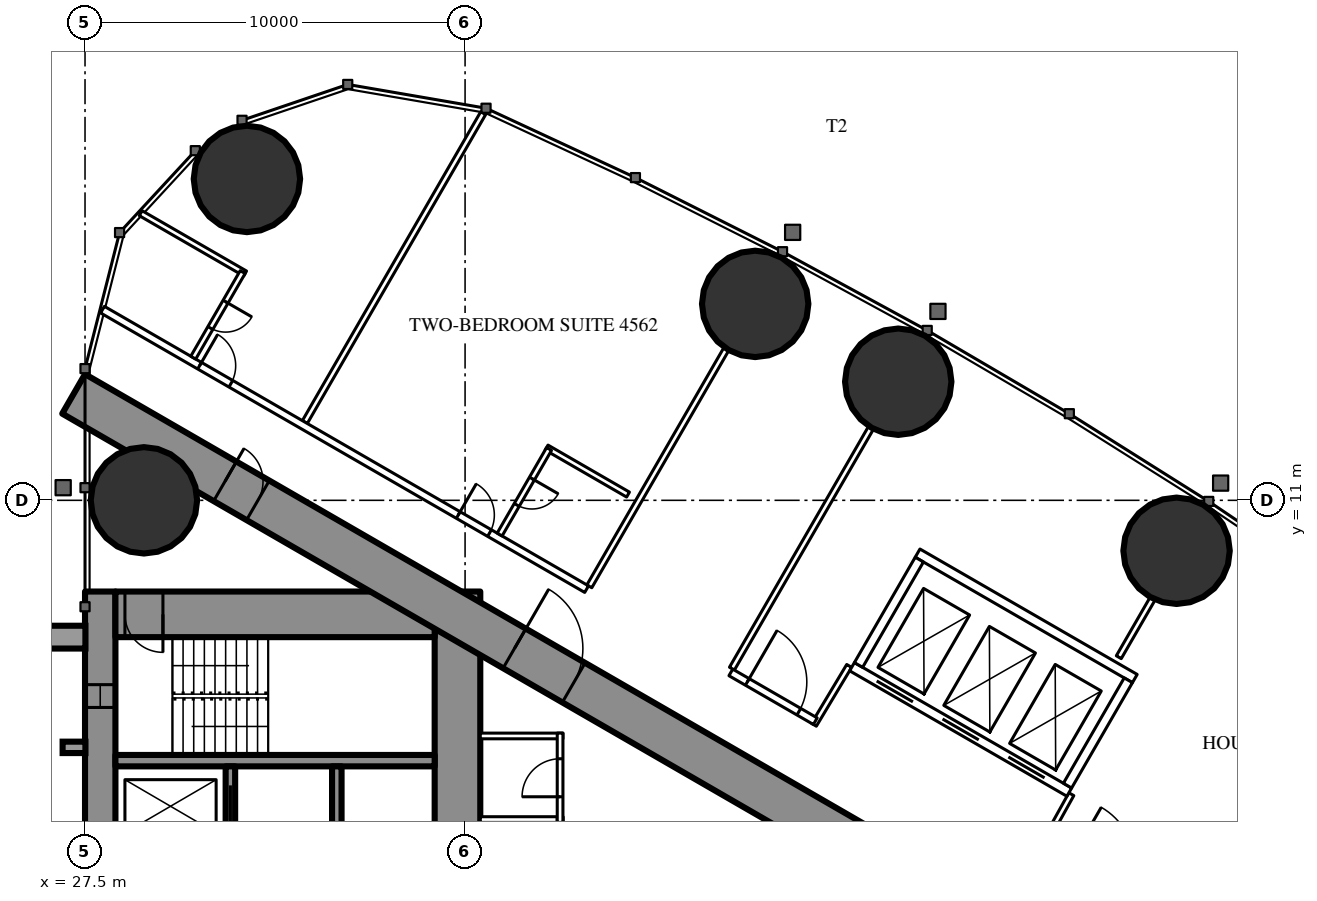
"""IFC4 building model, lengths in metres.
Left out: names, types, materials, properties, quantities, classifications, styles, units other than length and angle.
Written with IfcOpenShell. Run it as: python <this file> out.ifc"""

import sys

from ifc_helpers import new_model, si_unit, direction, frame, frame_2d, origin, origin_2d, place, context, subcontext, project, spatial, rectangle, circle, extrude, element, fill, save


model = new_model("IFC4")
c1 = context("Model", 3, precision=1e-05, world=origin(), true_north=direction((0.0, 1.0)))
c2 = subcontext(c1, "Body", "Model", "MODEL_VIEW")
j1 = project(units=[si_unit("LENGTHUNIT", "METRE"), si_unit("PLANEANGLEUNIT", "RADIAN")], contexts=[c1])
p1 = place(None, origin())
s1 = spatial("IfcSite", under=j1, at=p1, CompositionType="ELEMENT")
p2 = place(p1, origin())
s2 = spatial("IfcBuilding", under=s1, at=p2, CompositionType="ELEMENT")
p3 = place(p2, frame((0.0, 0.0, 170.3)))
s3 = spatial("IfcBuildingStorey", under=s2, at=p3, CompositionType="ELEMENT", Elevation=170.3)
for number, where, z_axis, x_axis in (
    (1, (31.76, 19.456, 0.0), (0.0, 0.0, 1.0), (1.0, 0.0, 0.0)),
    (2, (29.05, 11.0, 0.0), (0.0, 0.0, 1.0), (1.0, 0.0, 0.0)),
    (3, (56.221, 9.672, 0.0), (0.0, 0.0, 1.0), (1.0, 0.0, 0.0)),
    (4, (48.897, 14.121, 0.0), (0.0, 0.0, 1.0), (1.0, 0.0, 0.0)),
    (5, (45.134, 16.168, 0.0), (0.0, 0.0, 1.0), (1.0, 0.0, 0.0)),
):
    element("IfcColumn", number, at=place(p3, frame(where, z_axis=z_axis, x_axis=x_axis)), inside=s3, PredefinedType="COLUMN", context=c2, shape_type="SweptSolid", body=[
        extrude(circle(Radius=1.4, at=origin_2d()), origin(), (0.0, 0.0, 1.0), 3.5),
    ])
p4 = place(p3, frame((27.9, -8.6, 0.0), z_axis=(0.0, 0.0, 1.0), x_axis=(0.0, 1.0, 0.0)))
e6 = element("IfcWall", 6, at=p4, inside=s3, PredefinedType="SHEAR", context=c2, shape_type="SweptSolid", body=[
    extrude(rectangle(XDim=17.2, YDim=0.8, at=frame_2d((8.6, 0.0))), origin(), (0.0, 0.0, 1.0), 3.5),
])
p5 = place(p4, frame((2.45, 0.0, 0.6)))
e7 = element("IfcOpeningElement", 7, at=p5, cuts=e6, PredefinedType="OPENING", context=c2, shape_type="SweptSolid", body=[
    extrude(rectangle(XDim=0.6, YDim=2.1, at=frame_2d((0.3, 1.05))), frame((0.0, 0.41, 0.0), z_axis=(0.0, -1.0, 0.0), x_axis=(1.0, 0.0, 0.0)), (0.0, 0.0, 1.0), 0.82),
])
p6 = place(p4, frame((14.15, 0.0, 0.6)))
e8 = element("IfcOpeningElement", 8, at=p6, cuts=e6, PredefinedType="OPENING", context=c2, shape_type="SweptSolid", body=[
    extrude(rectangle(XDim=0.6, YDim=2.1, at=frame_2d((0.3, 1.05))), frame((0.0, 0.41, 0.0), z_axis=(0.0, -1.0, 0.0), x_axis=(1.0, 0.0, 0.0)), (0.0, 0.0, 1.0), 0.82),
])
p7 = place(p3, frame((37.3, -8.6, 0.0), z_axis=(0.0, 0.0, 1.0), x_axis=(0.0, 1.0, 0.0)))
e9 = element("IfcWall", 9, at=p7, inside=s3, PredefinedType="SHEAR", context=c2, shape_type="SweptSolid", body=[
    extrude(rectangle(XDim=17.2, YDim=1.2, at=frame_2d((8.6, 0.0))), origin(), (0.0, 0.0, 1.0), 3.5),
])
p8 = place(p7, frame((7.7, 0.0, 0.0)))
e10 = element("IfcOpeningElement", 10, at=p8, cuts=e9, PredefinedType="OPENING", context=c2, shape_type="SweptSolid", body=[
    extrude(rectangle(XDim=1.8, YDim=2.2, at=frame_2d((0.9, 1.1))), frame((0.0, 0.61, 0.0), z_axis=(0.0, -1.0, 0.0), x_axis=(1.0, 0.0, 0.0)), (0.0, 0.0, 1.0), 1.22),
])
p9 = place(p3, frame((28.3, 8.0, 0.0), z_axis=(0.0, 0.0, 1.0), x_axis=(1.0, 0.0, 0.0)))
e11 = element("IfcWall", 11, at=p9, inside=s3, PredefinedType="SHEAR", context=c2, shape_type="SweptSolid", body=[
    extrude(rectangle(XDim=8.4, YDim=1.2, at=frame_2d((4.2, 0.0))), origin(), (0.0, 0.0, 1.0), 3.5),
])
p10 = place(p9, frame((0.25, 0.0, 0.0)))
e12 = element("IfcOpeningElement", 12, at=p10, cuts=e11, PredefinedType="OPENING", context=c2, shape_type="SweptSolid", body=[
    extrude(rectangle(XDim=1.0, YDim=2.2, at=frame_2d((0.5, 1.1))), frame((0.0, 0.61, 0.0), z_axis=(0.0, -1.0, 0.0), x_axis=(1.0, 0.0, 0.0)), (0.0, 0.0, 1.0), 1.22),
])
p11 = place(p3, frame((28.3, 4.15, 0.0), z_axis=(0.0, 0.0, 1.0), x_axis=(1.0, 0.0, 0.0)))
e13 = element("IfcWall", 13, at=p11, inside=s3, PredefinedType="SHEAR", context=c2, shape_type="SweptSolid", body=[
    extrude(rectangle(XDim=8.4, YDim=0.3, at=frame_2d((4.2, 0.0))), origin(), (0.0, 0.0, 1.0), 3.5),
])
p12 = place(p3, frame((31.325, 1.9, 0.0), z_axis=(0.0, 0.0, 1.0), x_axis=(0.0, 1.0, 0.0)))
e14 = element("IfcWall", 14, at=p12, inside=s3, PredefinedType="SHEAR", context=c2, shape_type="SweptSolid", body=[
    extrude(rectangle(XDim=2.1, YDim=0.25, at=frame_2d((1.05, 0.0))), origin(), (0.0, 0.0, 1.0), 3.5),
])
p13 = place(p12, frame((0.5, 0.0, 0.0)))
e15 = element("IfcOpeningElement", 15, at=p13, cuts=e14, PredefinedType="OPENING", context=c2, shape_type="SweptSolid", body=[
    extrude(rectangle(XDim=1.1, YDim=2.2, at=frame_2d((0.55, 1.1))), frame((0.0, 0.135, 0.0), z_axis=(0.0, -1.0, 0.0), x_axis=(1.0, 0.0, 0.0)), (0.0, 0.0, 1.0), 0.27),
])
p14 = place(p3, frame((34.125, 1.65, 0.0), z_axis=(0.0, 0.0, 1.0), x_axis=(0.0, 1.0, 0.0)))
e16 = element("IfcWall", 16, at=p14, inside=s3, PredefinedType="SHEAR", context=c2, shape_type="SweptSolid", body=[
    extrude(rectangle(XDim=2.35, YDim=0.25, at=frame_2d((1.175, 0.0))), origin(), (0.0, 0.0, 1.0), 3.5),
])
p15 = place(p3, frame((27.2, 13.8, 0.0), z_axis=(0.0, 0.0, 1.0), x_axis=(0.866024515034, -0.500001539357, 0.0)))
e17 = element("IfcWall", 17, at=p15, inside=s3, PredefinedType="SHEAR", context=c2, shape_type="SweptSolid", body=[
    extrude(rectangle(XDim=26.907, YDim=1.2, at=frame_2d((13.454, 0.0))), origin(), (0.0, 0.0, 1.0), 3.5),
])
p16 = place(p15, frame((4.6, 0.0, 0.0)))
e18 = element("IfcOpeningElement", 18, at=p16, cuts=e17, PredefinedType="OPENING", context=c2, shape_type="SweptSolid", body=[
    extrude(rectangle(XDim=1.0, YDim=2.2, at=frame_2d((0.5, 1.1))), frame((0.0, 0.61, 0.0), z_axis=(0.0, -1.0, 0.0), x_axis=(1.0, 0.0, 0.0)), (0.0, 0.0, 1.0), 1.22),
])
p17 = place(p15, frame((13.395, 0.0, 0.0)))
e19 = element("IfcOpeningElement", 19, at=p17, cuts=e17, PredefinedType="OPENING", context=c2, shape_type="SweptSolid", body=[
    extrude(rectangle(XDim=1.8, YDim=2.2, at=frame_2d((0.9, 1.1))), frame((0.0, 0.61, 0.0), z_axis=(0.0, -1.0, 0.0), x_axis=(1.0, 0.0, 0.0)), (0.0, 0.0, 1.0), 1.22),
])
p18 = place(p3, frame((33.284, 13.059, 0.0), z_axis=(0.0, 0.0, 1.0), x_axis=(0.499985904184, 0.866033541855, 0.0)))
e20 = element("IfcWall", 20, at=p18, inside=s3, PredefinedType="PARTITIONING", context=c2, shape_type="SweptSolid", body=[
    extrude(rectangle(XDim=9.385, YDim=0.15, at=frame_2d((4.693, 0.0))), origin(), (0.0, 0.0, 1.0), 3.25),
])
p19 = place(p3, frame((40.769, 8.737, 0.0), z_axis=(0.0, 0.0, 1.0), x_axis=(0.500013115284, 0.866017831539, 0.0)))
e21 = element("IfcWall", 21, at=p19, inside=s3, PredefinedType="PARTITIONING", context=c2, shape_type="SweptSolid", body=[
    extrude(rectangle(XDim=7.198, YDim=0.15, at=frame_2d((3.599, 0.0))), origin(), (0.0, 0.0, 1.0), 2.3),
])
p20 = place(p3, frame((44.521, 6.571, 0.0), z_axis=(0.0, 0.0, 1.0), x_axis=(0.500020376429, 0.866013639128, 0.0)))
e22 = element("IfcWall", 22, at=p20, inside=s3, PredefinedType="PARTITIONING", context=c2, shape_type="SweptSolid", body=[
    extrude(rectangle(XDim=7.306, YDim=0.15, at=frame_2d((3.653, 0.0))), origin(), (0.0, 0.0, 1.0), 2.3),
])
p21 = place(p3, frame((54.7, 6.872, 0.0), z_axis=(0.0, 0.0, 1.0), x_axis=(0.499989690894, 0.866031355668, 0.0)))
e23 = element("IfcWall", 23, at=p21, inside=s3, PredefinedType="PARTITIONING", context=c2, shape_type="SweptSolid", body=[
    extrude(rectangle(XDim=1.766, YDim=0.15, at=frame_2d((0.883, 0.0))), origin(), (0.0, 0.0, 1.0), 3.25),
])
p22 = place(p3, frame((52.576, 1.689, 0.0), z_axis=(0.0, 0.0, 1.0), x_axis=(0.485424724123, 0.874278466629, 0.0)))
e24 = element("IfcWall", 24, at=p22, inside=s3, PredefinedType="PARTITIONING", context=c2, shape_type="SweptSolid", body=[
    extrude(rectangle(XDim=1.805, YDim=0.15, at=frame_2d((0.903, 0.0))), origin(), (0.0, 0.0, 1.0), 3.25),
])
p23 = place(p3, frame((47.606, 6.643, 0.0), z_axis=(0.0, 0.0, 1.0), x_axis=(-0.514237157483, -0.857648031458, 0.0)))
e25 = element("IfcWall", 25, at=p23, inside=s3, PredefinedType="PARTITIONING", context=c2, shape_type="SweptSolid", body=[
    extrude(rectangle(XDim=1.805, YDim=0.15, at=frame_2d((0.902, 0.0))), origin(), (0.0, 0.0, 1.0), 3.25),
])
p24 = place(p3, frame((27.959, 16.017, 0.0), z_axis=(0.0, 0.0, 1.0), x_axis=(0.866024165033, -0.500002145574, 0.0)))
e26 = element("IfcWall", 26, at=p24, inside=s3, PredefinedType="PARTITIONING", context=c2, shape_type="SweptSolid", body=[
    extrude(rectangle(XDim=14.709, YDim=0.2, at=frame_2d((7.354, 0.0))), origin(), (0.0, 0.0, 1.0), 3.25),
])
p25 = place(p24, frame((10.809, 0.0, 0.0)))
e27 = element("IfcOpeningElement", 27, at=p25, cuts=e26, PredefinedType="OPENING", context=c2, shape_type="SweptSolid", body=[
    extrude(rectangle(XDim=0.95, YDim=2.2, at=frame_2d((0.475, 1.1))), frame((0.0, 0.11, 0.0), z_axis=(0.0, -1.0, 0.0), x_axis=(1.0, 0.0, 0.0)), (0.0, 0.0, 1.0), 0.22),
])
p26 = place(p24, frame((2.95, 0.0, 0.0)))
e28 = element("IfcOpeningElement", 28, at=p26, cuts=e26, PredefinedType="OPENING", context=c2, shape_type="SweptSolid", body=[
    extrude(rectangle(XDim=0.95, YDim=2.2, at=frame_2d((0.475, 1.1))), frame((0.0, 0.11, 0.0), z_axis=(0.0, -1.0, 0.0), x_axis=(1.0, 0.0, 0.0)), (0.0, 0.0, 1.0), 0.22),
])
p27 = place(p3, frame((44.493, 6.472, 0.0), z_axis=(0.0, 0.0, 1.0), x_axis=(0.866027140358, -0.499996992154, 0.0)))
e29 = element("IfcWall", 29, at=p27, inside=s3, PredefinedType="PARTITIONING", context=c2, shape_type="SweptSolid", body=[
    extrude(rectangle(XDim=2.566, YDim=0.2, at=frame_2d((1.283, 0.0))), origin(), (0.0, 0.0, 1.0), 3.25),
])
p28 = place(p27, frame((0.5, 0.0, 0.0)))
e30 = element("IfcOpeningElement", 30, at=p28, cuts=e29, PredefinedType="OPENING", context=c2, shape_type="SweptSolid", body=[
    extrude(rectangle(XDim=1.566, YDim=2.2, at=frame_2d((0.783, 1.1))), frame((0.0, 0.11, 0.0), z_axis=(0.0, -1.0, 0.0), x_axis=(1.0, 0.0, 0.0)), (0.0, 0.0, 1.0), 0.22),
])
p29 = place(p3, frame((39.645, 12.389, 0.0), z_axis=(0.0, 0.0, 1.0), x_axis=(0.866006523861, -0.500032699561, 0.0)))
e31 = element("IfcWall", 31, at=p29, inside=s3, PredefinedType="PARTITIONING", context=c2, shape_type="SweptSolid", body=[
    extrude(rectangle(XDim=2.475, YDim=0.15, at=frame_2d((1.237, 0.0))), origin(), (0.0, 0.0, 1.0), 3.25),
])
p30 = place(p3, frame((38.409, 10.099, 0.0), z_axis=(0.0, 0.0, 1.0), x_axis=(0.500006934395, 0.866021400173, 0.0)))
e32 = element("IfcWall", 32, at=p30, inside=s3, PredefinedType="PARTITIONING", context=c2, shape_type="SweptSolid", body=[
    extrude(rectangle(XDim=2.6, YDim=0.15, at=frame_2d((1.3, 0.0))), origin(), (0.0, 0.0, 1.0), 3.25),
])
p31 = place(p30, frame((0.9, 0.0, 0.0)))
e33 = element("IfcOpeningElement", 33, at=p31, cuts=e32, PredefinedType="OPENING", context=c2, shape_type="SweptSolid", body=[
    extrude(rectangle(XDim=0.8, YDim=2.2, at=frame_2d((0.4, 1.1))), frame((0.0, 0.085, 0.0), z_axis=(0.0, -1.0, 0.0), x_axis=(1.0, 0.0, 0.0)), (0.0, 0.0, 1.0), 0.17),
])
p32 = place(p3, frame((28.965, 18.554, 0.0), z_axis=(0.0, 0.0, 1.0), x_axis=(0.866008740531, -0.500028860491, 0.0)))
e34 = element("IfcWall", 34, at=p32, inside=s3, PredefinedType="PARTITIONING", context=c2, shape_type="SweptSolid", body=[
    extrude(rectangle(XDim=3.173, YDim=0.15, at=frame_2d((1.586, 0.0))), origin(), (0.0, 0.0, 1.0), 3.25),
])
p33 = place(p3, frame((30.348, 14.754, 0.0), z_axis=(0.0, 0.0, 1.0), x_axis=(0.500006934395, 0.866021400173, 0.0)))
e35 = element("IfcWall", 35, at=p33, inside=s3, PredefinedType="PARTITIONING", context=c2, shape_type="SweptSolid", body=[
    extrude(rectangle(XDim=2.6, YDim=0.15, at=frame_2d((1.3, 0.0))), origin(), (0.0, 0.0, 1.0), 2.3),
])
p34 = place(p33, frame((0.9, 0.0, 0.0)))
e36 = element("IfcOpeningElement", 36, at=p34, cuts=e35, PredefinedType="OPENING", context=c2, shape_type="SweptSolid", body=[
    extrude(rectangle(XDim=0.8, YDim=2.2, at=frame_2d((0.4, 1.1))), frame((0.0, 0.085, 0.0), z_axis=(0.0, -1.0, 0.0), x_axis=(1.0, 0.0, 0.0)), (0.0, 0.0, 1.0), 0.17),
])
for number, where, z_axis, x_axis in (
    (37, (37.9, 2.6, 0.0), (0.0, 0.0, 1.0), (1.0, 0.0, 0.0)),
    (38, (37.9, 4.8, 0.0), (0.0, 0.0, 1.0), (1.0, 0.0, 0.0)),
):
    element("IfcWall", number, at=place(p3, frame(where, z_axis=z_axis, x_axis=x_axis)), inside=s3, PredefinedType="PARTITIONING", context=c2, shape_type="SweptSolid", body=[
        extrude(rectangle(XDim=2.175, YDim=0.15, at=frame_2d((1.087, 0.0))), origin(), (0.0, 0.0, 1.0), 3.25),
    ])
p35 = place(p3, frame((40.0, 1.125, 0.0), z_axis=(0.0, 0.0, 1.0), x_axis=(0.0, 1.0, 0.0)))
e39 = element("IfcWall", 39, at=p35, inside=s3, PredefinedType="PARTITIONING", context=c2, shape_type="SweptSolid", body=[
    extrude(rectangle(XDim=1.55, YDim=0.15, at=frame_2d((0.775, 0.0))), origin(), (0.0, 0.0, 1.0), 3.25),
])
p36 = place(p35, frame((0.275, 0.0, 0.0)))
e40 = element("IfcOpeningElement", 40, at=p36, cuts=e39, PredefinedType="OPENING", context=c2, shape_type="SweptSolid", body=[
    extrude(rectangle(XDim=1.0, YDim=2.2, at=frame_2d((0.5, 1.1))), frame((0.0, 0.085, 0.0), z_axis=(0.0, -1.0, 0.0), x_axis=(1.0, 0.0, 0.0)), (0.0, 0.0, 1.0), 0.17),
])
p37 = place(p3, frame((40.0, 2.525, 0.0), z_axis=(0.0, 0.0, 1.0), x_axis=(0.0, 1.0, 0.0)))
e41 = element("IfcWall", 41, at=p37, inside=s3, PredefinedType="PARTITIONING", context=c2, shape_type="SweptSolid", body=[
    extrude(rectangle(XDim=2.35, YDim=0.15, at=frame_2d((1.175, 0.0))), origin(), (0.0, 0.0, 1.0), 3.25),
])
p38 = place(p37, frame((0.675, 0.0, 0.0)))
e42 = element("IfcOpeningElement", 42, at=p38, cuts=e41, PredefinedType="OPENING", context=c2, shape_type="SweptSolid", body=[
    extrude(rectangle(XDim=1.0, YDim=2.2, at=frame_2d((0.5, 1.1))), frame((0.0, 0.085, 0.0), z_axis=(0.0, -1.0, 0.0), x_axis=(1.0, 0.0, 0.0)), (0.0, 0.0, 1.0), 0.17),
])
p39 = place(p3, frame((47.681, 6.622, 0.0), z_axis=(0.0, 0.0, 1.0), x_axis=(0.86603344179, -0.499986077507, 0.0)))
e43 = element("IfcWall", 43, at=p39, inside=s3, PredefinedType="PARTITIONING", context=c2, shape_type="SweptSolid", body=[
    extrude(rectangle(XDim=6.6, YDim=0.25, at=frame_2d((3.3, 0.0))), origin(), (0.0, 0.0, 1.0), 3.25),
])
p40 = place(p39, frame((0.75, 0.0, 0.0)))
e44 = element("IfcOpeningElement", 44, at=p40, cuts=e43, PredefinedType="OPENING", context=c2, shape_type="SweptSolid", body=[
    extrude(rectangle(XDim=1.1, YDim=2.2, at=frame_2d((0.55, 1.1))), frame((0.0, 0.135, 0.0), z_axis=(0.0, -1.0, 0.0), x_axis=(1.0, 0.0, 0.0)), (0.0, 0.0, 1.0), 0.27),
])
p41 = place(p39, frame((2.75, 0.0, 0.0)))
e45 = element("IfcOpeningElement", 45, at=p41, cuts=e43, PredefinedType="OPENING", context=c2, shape_type="SweptSolid", body=[
    extrude(rectangle(XDim=1.1, YDim=2.2, at=frame_2d((0.55, 1.1))), frame((0.0, 0.135, 0.0), z_axis=(0.0, -1.0, 0.0), x_axis=(1.0, 0.0, 0.0)), (0.0, 0.0, 1.0), 0.27),
])
p42 = place(p39, frame((4.75, 0.0, 0.0)))
e46 = element("IfcOpeningElement", 46, at=p42, cuts=e43, PredefinedType="OPENING", context=c2, shape_type="SweptSolid", body=[
    extrude(rectangle(XDim=1.1, YDim=2.2, at=frame_2d((0.55, 1.1))), frame((0.0, 0.135, 0.0), z_axis=(0.0, -1.0, 0.0), x_axis=(1.0, 0.0, 0.0)), (0.0, 0.0, 1.0), 0.27),
])
p43 = place(p3, frame((49.406, 9.611, 0.0), z_axis=(0.0, 0.0, 1.0), x_axis=(0.86603344179, -0.499986077507, 0.0)))
e47 = element("IfcWall", 47, at=p43, inside=s3, PredefinedType="PARTITIONING", context=c2, shape_type="SweptSolid", body=[
    extrude(rectangle(XDim=6.6, YDim=0.25, at=frame_2d((3.3, 0.0))), origin(), (0.0, 0.0, 1.0), 3.25),
])
p44 = place(p3, frame((47.852, 6.668, 0.0), z_axis=(0.0, 0.0, 1.0), x_axis=(0.499929347863, 0.866066190972, 0.0)))
e48 = element("IfcWall", 48, at=p44, inside=s3, PredefinedType="PARTITIONING", context=c2, shape_type="SweptSolid", body=[
    extrude(rectangle(XDim=3.201, YDim=0.25, at=frame_2d((1.6, 0.0))), origin(), (0.0, 0.0, 1.0), 3.25),
])
p45 = place(p3, frame((53.352, 3.493, 0.0), z_axis=(0.0, 0.0, 1.0), x_axis=(0.499872130319, 0.866099216793, 0.0)))
e49 = element("IfcWall", 49, at=p45, inside=s3, PredefinedType="PARTITIONING", context=c2, shape_type="SweptSolid", body=[
    extrude(rectangle(XDim=3.2, YDim=0.25, at=frame_2d((1.6, 0.0))), origin(), (0.0, 0.0, 1.0), 3.25),
])
p46 = place(p31, origin())
e50 = element("IfcDoor", 50, at=p46, inside=s3, OperationType="SINGLE_SWING_RIGHT", PredefinedType="DOOR", context=c2, shape_type="SweptSolid", body=[
    extrude(rectangle(XDim=0.8, YDim=2.2, at=frame_2d((0.4, 1.1))), frame((0.0, 0.025, 0.0), z_axis=(0.0, -1.0, 0.0), x_axis=(1.0, 0.0, 0.0)), (0.0, 0.0, 1.0), 0.05),
])
fill(e33, e50)
p47 = place(p25, origin())
e51 = element("IfcDoor", 51, at=p47, inside=s3, OperationType="SINGLE_SWING_LEFT", PredefinedType="DOOR", context=c2, shape_type="SweptSolid", body=[
    extrude(rectangle(XDim=0.95, YDim=2.2, at=frame_2d((0.475, 1.1))), frame((0.0, 0.025, 0.0), z_axis=(0.0, -1.0, 0.0), x_axis=(1.0, 0.0, 0.0)), (0.0, 0.0, 1.0), 0.05),
])
fill(e27, e51)
p48 = place(p34, origin())
e52 = element("IfcDoor", 52, at=p48, inside=s3, OperationType="SINGLE_SWING_RIGHT", PredefinedType="DOOR", context=c2, shape_type="SweptSolid", body=[
    extrude(rectangle(XDim=0.8, YDim=2.2, at=frame_2d((0.4, 1.1))), frame((0.0, 0.025, 0.0), z_axis=(0.0, -1.0, 0.0), x_axis=(1.0, 0.0, 0.0)), (0.0, 0.0, 1.0), 0.05),
])
fill(e36, e52)
p49 = place(p26, origin())
e53 = element("IfcDoor", 53, at=p49, inside=s3, OperationType="SINGLE_SWING_LEFT", PredefinedType="DOOR", context=c2, shape_type="SweptSolid", body=[
    extrude(rectangle(XDim=0.95, YDim=2.2, at=frame_2d((0.475, 1.1))), frame((0.0, 0.025, 0.0), z_axis=(0.0, -1.0, 0.0), x_axis=(1.0, 0.0, 0.0)), (0.0, 0.0, 1.0), 0.05),
])
fill(e28, e53)
p50 = place(p28, origin())
e54 = element("IfcDoor", 54, at=p50, inside=s3, OperationType="SINGLE_SWING_LEFT", PredefinedType="DOOR", context=c2, shape_type="SweptSolid", body=[
    extrude(rectangle(XDim=1.566, YDim=2.2, at=frame_2d((0.783, 1.1))), frame((0.0, 0.025, 0.0), z_axis=(0.0, -1.0, 0.0), x_axis=(1.0, 0.0, 0.0)), (0.0, 0.0, 1.0), 0.05),
])
fill(e30, e54)
p51 = place(p38, origin())
e55 = element("IfcDoor", 55, at=p51, inside=s3, OperationType="SINGLE_SWING_LEFT", PredefinedType="DOOR", context=c2, shape_type="SweptSolid", body=[
    extrude(rectangle(XDim=1.0, YDim=2.2, at=frame_2d((0.5, 1.1))), frame((0.0, 0.025, 0.0), z_axis=(0.0, -1.0, 0.0), x_axis=(1.0, 0.0, 0.0)), (0.0, 0.0, 1.0), 0.05),
])
fill(e42, e55)
p52 = place(p16, origin())
e56 = element("IfcDoor", 56, at=p52, inside=s3, OperationType="SINGLE_SWING_LEFT", PredefinedType="DOOR", context=c2, shape_type="SweptSolid", body=[
    extrude(rectangle(XDim=1.0, YDim=2.2, at=frame_2d((0.5, 1.1))), frame((0.0, 0.025, 0.0), z_axis=(0.0, -1.0, 0.0), x_axis=(1.0, 0.0, 0.0)), (0.0, 0.0, 1.0), 0.05),
])
fill(e18, e56)
p53 = place(p17, origin())
e57 = element("IfcDoor", 57, at=p53, inside=s3, OperationType="DOUBLE_DOOR_SINGLE_SWING", PredefinedType="DOOR", context=c2, shape_type="SweptSolid", body=[
    extrude(rectangle(XDim=1.8, YDim=2.2, at=frame_2d((0.9, 1.1))), frame((0.0, 0.025, 0.0), z_axis=(0.0, -1.0, 0.0), x_axis=(1.0, 0.0, 0.0)), (0.0, 0.0, 1.0), 0.05),
])
fill(e19, e57)
p54 = place(p10, origin())
e58 = element("IfcDoor", 58, at=p54, inside=s3, OperationType="SINGLE_SWING_RIGHT", PredefinedType="DOOR", context=c2, shape_type="SweptSolid", body=[
    extrude(rectangle(XDim=1.0, YDim=2.2, at=frame_2d((0.5, 1.1))), frame((0.0, 0.025, 0.0), z_axis=(0.0, -1.0, 0.0), x_axis=(1.0, 0.0, 0.0)), (0.0, 0.0, 1.0), 0.05),
])
fill(e12, e58)
p55 = place(p13, origin())
e59 = element("IfcDoor", 59, at=p55, inside=s3, OperationType="SLIDING_TO_LEFT", PredefinedType="USERDEFINED", context=c2, shape_type="SweptSolid", body=[
    extrude(rectangle(XDim=1.1, YDim=2.2, at=frame_2d((0.55, 1.1))), frame((0.0, 0.025, 0.0), z_axis=(0.0, -1.0, 0.0), x_axis=(1.0, 0.0, 0.0)), (0.0, 0.0, 1.0), 0.05),
])
fill(e15, e59)
p56 = place(p40, origin())
e60 = element("IfcDoor", 60, at=p56, inside=s3, OperationType="DOUBLE_DOOR_SLIDING", PredefinedType="USERDEFINED", context=c2, shape_type="SweptSolid", body=[
    extrude(rectangle(XDim=1.1, YDim=2.2, at=frame_2d((0.55, 1.1))), frame((0.0, 0.025, 0.0), z_axis=(0.0, -1.0, 0.0), x_axis=(1.0, 0.0, 0.0)), (0.0, 0.0, 1.0), 0.05),
])
fill(e44, e60)
p57 = place(p41, origin())
e61 = element("IfcDoor", 61, at=p57, inside=s3, OperationType="DOUBLE_DOOR_SLIDING", PredefinedType="USERDEFINED", context=c2, shape_type="SweptSolid", body=[
    extrude(rectangle(XDim=1.1, YDim=2.2, at=frame_2d((0.55, 1.1))), frame((0.0, 0.025, 0.0), z_axis=(0.0, -1.0, 0.0), x_axis=(1.0, 0.0, 0.0)), (0.0, 0.0, 1.0), 0.05),
])
fill(e45, e61)
p58 = place(p42, origin())
e62 = element("IfcDoor", 62, at=p58, inside=s3, OperationType="DOUBLE_DOOR_SLIDING", PredefinedType="USERDEFINED", context=c2, shape_type="SweptSolid", body=[
    extrude(rectangle(XDim=1.1, YDim=2.2, at=frame_2d((0.55, 1.1))), frame((0.0, 0.025, 0.0), z_axis=(0.0, -1.0, 0.0), x_axis=(1.0, 0.0, 0.0)), (0.0, 0.0, 1.0), 0.05),
])
fill(e46, e62)
p59 = place(p6, origin())
e63 = element("IfcWindow", 63, at=p59, inside=s3, PartitioningType="SINGLE_PANEL", PredefinedType="WINDOW", context=c2, shape_type="SweptSolid", body=[
    extrude(rectangle(XDim=0.6, YDim=2.1, at=frame_2d((0.3, 1.05))), frame((0.0, 0.03, 0.0), z_axis=(0.0, -1.0, 0.0), x_axis=(1.0, 0.0, 0.0)), (0.0, 0.0, 1.0), 0.06),
])
fill(e8, e63)
save(model, sys.argv[1])
